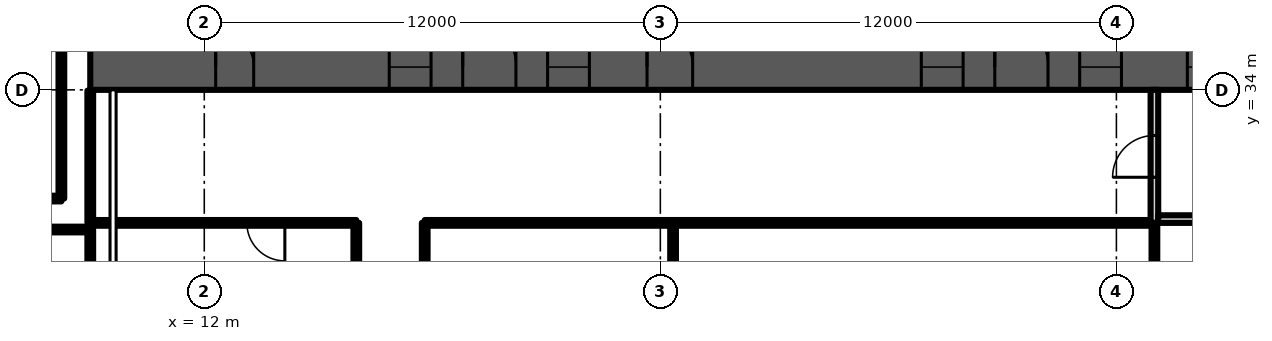
"""IFC4 building model, lengths in metres.
Left out: names, types, materials, properties, quantities, classifications, styles, units other than length and angle.
Written with IfcOpenShell. Run it as: python <this file> out.ifc"""

import sys

from ifc_helpers import new_model, si_unit, direction, frame, frame_2d, origin, place, context, subcontext, project, spatial, rectangle, extrude, element, fill, save


model = new_model("IFC4")
c1 = context("Model", 3, precision=1e-05, world=origin(), true_north=direction((0.0, 1.0)))
c2 = subcontext(c1, "Body", "Model", "MODEL_VIEW")
j1 = project(units=[si_unit("LENGTHUNIT", "METRE"), si_unit("PLANEANGLEUNIT", "RADIAN")], contexts=[c1])
p1 = place(None, origin())
s1 = spatial("IfcSite", under=j1, at=p1, CompositionType="ELEMENT")
p2 = place(p1, origin())
s2 = spatial("IfcBuilding", under=s1, at=p2, CompositionType="ELEMENT")
p3 = place(p2, frame((0.0, 0.0, 91.9)))
s3 = spatial("IfcBuildingStorey", under=s2, at=p3, CompositionType="ELEMENT", Elevation=91.9)
p4 = place(p3, frame((9.0, 34.6, 0.0), z_axis=(0.0, 0.0, 1.0), x_axis=(1.0, 0.0, 0.0)))
e1 = element("IfcWall", 1, at=p4, inside=s3, PredefinedType="SHEAR", context=c2, shape_type="SweptSolid", body=[
    extrude(rectangle(XDim=56.0, YDim=1.2, at=frame_2d((28.0, 0.0))), origin(), (0.0, 0.0, 1.0), 4.8),
])
p5 = place(p4, frame((3.3, 0.0, 0.0)))
e2 = element("IfcOpeningElement", 2, at=p5, cuts=e1, PredefinedType="OPENING", context=c2, shape_type="SweptSolid", body=[
    extrude(rectangle(XDim=1.0, YDim=2.1, at=frame_2d((0.5, 1.05))), frame((0.0, 0.61, 0.0), z_axis=(0.0, -1.0, 0.0), x_axis=(1.0, 0.0, 0.0)), (0.0, 0.0, 1.0), 1.22),
])
p6 = place(p4, frame((7.867, 0.0, 0.0)))
e3 = element("IfcOpeningElement", 3, at=p6, cuts=e1, PredefinedType="OPENING", context=c2, shape_type="SweptSolid", body=[
    extrude(rectangle(XDim=1.1, YDim=2.1, at=frame_2d((0.55, 1.05))), frame((0.0, 0.61, 0.0), z_axis=(0.0, -1.0, 0.0), x_axis=(1.0, 0.0, 0.0)), (0.0, 0.0, 1.0), 1.22),
])
p7 = place(p4, frame((12.033, 0.0, 0.0)))
e4 = element("IfcOpeningElement", 4, at=p7, cuts=e1, PredefinedType="OPENING", context=c2, shape_type="SweptSolid", body=[
    extrude(rectangle(XDim=1.1, YDim=2.1, at=frame_2d((0.55, 1.05))), frame((0.0, 0.61, 0.0), z_axis=(0.0, -1.0, 0.0), x_axis=(1.0, 0.0, 0.0)), (0.0, 0.0, 1.0), 1.22),
])
p8 = place(p4, frame((9.8, 0.0, 0.0)))
e5 = element("IfcOpeningElement", 5, at=p8, cuts=e1, PredefinedType="OPENING", context=c2, shape_type="SweptSolid", body=[
    extrude(rectangle(XDim=1.4, YDim=2.1, at=frame_2d((0.7, 1.05))), frame((0.0, 0.61, 0.0), z_axis=(0.0, -1.0, 0.0), x_axis=(1.0, 0.0, 0.0)), (0.0, 0.0, 1.0), 1.22),
])
p9 = place(p4, frame((14.65, 0.0, 0.0)))
e6 = element("IfcOpeningElement", 6, at=p9, cuts=e1, PredefinedType="OPENING", context=c2, shape_type="SweptSolid", body=[
    extrude(rectangle(XDim=1.2, YDim=2.1, at=frame_2d((0.6, 1.05))), frame((0.0, 0.61, 0.0), z_axis=(0.0, -1.0, 0.0), x_axis=(1.0, 0.0, 0.0)), (0.0, 0.0, 1.0), 1.22),
])
p10 = place(p4, frame((21.867, 0.0, 0.0)))
e7 = element("IfcOpeningElement", 7, at=p10, cuts=e1, PredefinedType="OPENING", context=c2, shape_type="SweptSolid", body=[
    extrude(rectangle(XDim=1.1, YDim=2.1, at=frame_2d((0.55, 1.05))), frame((0.0, 0.61, 0.0), z_axis=(0.0, -1.0, 0.0), x_axis=(1.0, 0.0, 0.0)), (0.0, 0.0, 1.0), 1.22),
])
p11 = place(p4, frame((26.033, 0.0, 0.0)))
e8 = element("IfcOpeningElement", 8, at=p11, cuts=e1, PredefinedType="OPENING", context=c2, shape_type="SweptSolid", body=[
    extrude(rectangle(XDim=1.1, YDim=2.1, at=frame_2d((0.55, 1.05))), frame((0.0, 0.61, 0.0), z_axis=(0.0, -1.0, 0.0), x_axis=(1.0, 0.0, 0.0)), (0.0, 0.0, 1.0), 1.22),
])
p12 = place(p4, frame((23.8, 0.0, 0.0)))
e9 = element("IfcOpeningElement", 9, at=p12, cuts=e1, PredefinedType="OPENING", context=c2, shape_type="SweptSolid", body=[
    extrude(rectangle(XDim=1.4, YDim=2.1, at=frame_2d((0.7, 1.05))), frame((0.0, 0.61, 0.0), z_axis=(0.0, -1.0, 0.0), x_axis=(1.0, 0.0, 0.0)), (0.0, 0.0, 1.0), 1.22),
])
p13 = place(p4, frame((28.867, 0.0, 0.0)))
e10 = element("IfcOpeningElement", 10, at=p13, cuts=e1, PredefinedType="OPENING", context=c2, shape_type="SweptSolid", body=[
    extrude(rectangle(XDim=1.1, YDim=2.1, at=frame_2d((0.55, 1.05))), frame((0.0, 0.61, 0.0), z_axis=(0.0, -1.0, 0.0), x_axis=(1.0, 0.0, 0.0)), (0.0, 0.0, 1.0), 1.22),
])
p14 = place(p4, frame((33.033, 0.0, 0.0)))
e11 = element("IfcOpeningElement", 11, at=p14, cuts=e1, PredefinedType="OPENING", context=c2, shape_type="SweptSolid", body=[
    extrude(rectangle(XDim=1.1, YDim=2.1, at=frame_2d((0.55, 1.05))), frame((0.0, 0.61, 0.0), z_axis=(0.0, -1.0, 0.0), x_axis=(1.0, 0.0, 0.0)), (0.0, 0.0, 1.0), 1.22),
])
p15 = place(p4, frame((40.15, 0.0, 0.0)))
e12 = element("IfcOpeningElement", 12, at=p15, cuts=e1, PredefinedType="OPENING", context=c2, shape_type="SweptSolid", body=[
    extrude(rectangle(XDim=1.2, YDim=2.1, at=frame_2d((0.6, 1.05))), frame((0.0, 0.61, 0.0), z_axis=(0.0, -1.0, 0.0), x_axis=(1.0, 0.0, 0.0)), (0.0, 0.0, 1.0), 1.22),
])
p16 = place(p4, frame((44.8, 0.0, 0.0)))
e13 = element("IfcOpeningElement", 13, at=p16, cuts=e1, PredefinedType="OPENING", context=c2, shape_type="SweptSolid", body=[
    extrude(rectangle(XDim=1.4, YDim=2.1, at=frame_2d((0.7, 1.05))), frame((0.0, 0.61, 0.0), z_axis=(0.0, -1.0, 0.0), x_axis=(1.0, 0.0, 0.0)), (0.0, 0.0, 1.0), 1.22),
])
p17 = place(p4, frame((49.867, 0.0, 0.0)))
e14 = element("IfcOpeningElement", 14, at=p17, cuts=e1, PredefinedType="OPENING", context=c2, shape_type="SweptSolid", body=[
    extrude(rectangle(XDim=1.1, YDim=2.1, at=frame_2d((0.55, 1.05))), frame((0.0, 0.61, 0.0), z_axis=(0.0, -1.0, 0.0), x_axis=(1.0, 0.0, 0.0)), (0.0, 0.0, 1.0), 1.22),
])
p18 = place(p4, frame((53.5, 0.0, 0.0)))
e15 = element("IfcOpeningElement", 15, at=p18, cuts=e1, PredefinedType="OPENING", context=c2, shape_type="SweptSolid", body=[
    extrude(rectangle(XDim=1.1, YDim=2.1, at=frame_2d((0.55, 1.05))), frame((0.0, 0.61, 0.0), z_axis=(0.0, -1.0, 0.0), x_axis=(1.0, 0.0, 0.0)), (0.0, 0.0, 1.0), 1.22),
])
p19 = place(p4, frame((51.567, 0.0, 0.0)))
e16 = element("IfcOpeningElement", 16, at=p19, cuts=e1, PredefinedType="OPENING", context=c2, shape_type="SweptSolid", body=[
    extrude(rectangle(XDim=1.4, YDim=2.1, at=frame_2d((0.7, 1.05))), frame((0.0, 0.61, 0.0), z_axis=(0.0, -1.0, 0.0), x_axis=(1.0, 0.0, 0.0)), (0.0, 0.0, 1.0), 1.22),
])
p20 = place(p3, frame((37.0, 30.5, 0.0), z_axis=(0.0, 0.0, 1.0), x_axis=(0.0, 1.0, 0.0)))
e17 = element("IfcWall", 17, at=p20, inside=s3, PredefinedType="PARTITIONING", context=c2, shape_type="SweptSolid", body=[
    extrude(rectangle(XDim=3.5, YDim=0.2, at=frame_2d((1.75, 0.0))), origin(), (0.0, 0.0, 1.0), 4.4),
])
p21 = place(p20, frame((1.2, 0.0, 0.0)))
e18 = element("IfcOpeningElement", 18, at=p21, cuts=e17, PredefinedType="OPENING", context=c2, shape_type="SweptSolid", body=[
    extrude(rectangle(XDim=1.1, YDim=2.1, at=frame_2d((0.55, 1.05))), frame((0.0, 0.11, 0.0), z_axis=(0.0, -1.0, 0.0), x_axis=(1.0, 0.0, 0.0)), (0.0, 0.0, 1.0), 0.22),
])
p22 = place(p3, frame((37.1, 30.6, 0.0), z_axis=(0.0, 0.0, 1.0), x_axis=(1.0, 0.0, 0.0)))
e19 = element("IfcWall", 19, at=p22, inside=s3, PredefinedType="PARTITIONING", context=c2, shape_type="SweptSolid", body=[
    extrude(rectangle(XDim=2.8, YDim=0.2, at=frame_2d((1.4, 0.0))), origin(), (0.0, 0.0, 1.0), 4.4),
])
p23 = place(p3, frame((6.84, 30.325, 0.0), z_axis=(0.0, 0.0, 1.0), x_axis=(1.0, 0.0, 0.0)))
e20 = element("IfcWall", 20, at=p23, inside=s3, PredefinedType="PARTITIONING", context=c2, shape_type="SweptSolid", body=[
    extrude(rectangle(XDim=2.16, YDim=0.15, at=frame_2d((1.08, 0.0))), origin(), (0.0, 0.0, 1.0), 4.4),
])
p24 = place(p3, frame((6.84, 31.14, 0.0), z_axis=(0.0, 0.0, 1.0), x_axis=(1.0, 0.0, 0.0)))
e21 = element("IfcWall", 21, at=p24, inside=s3, PredefinedType="PARTITIONING", context=c2, shape_type="SweptSolid", body=[
    extrude(rectangle(XDim=1.4, YDim=0.15, at=frame_2d((0.7, 0.0))), origin(), (0.0, 0.0, 1.0), 4.4),
])
p25 = place(p3, frame((8.24, 31.14, 0.0), z_axis=(0.0, 0.0, 1.0), x_axis=(0.0, 1.0, 0.0)))
e22 = element("IfcWall", 22, at=p25, inside=s3, PredefinedType="PARTITIONING", context=c2, shape_type="SweptSolid", body=[
    extrude(rectangle(XDim=10.061, YDim=0.15, at=frame_2d((5.03, 0.0))), origin(), (0.0, 0.0, 1.0), 4.4),
])
p26 = place(p3, frame((9.0, 24.895, 0.0), z_axis=(0.0, 0.0, 1.0), x_axis=(0.0, 1.0, 0.0)))
e23 = element("IfcWall", 23, at=p26, inside=s3, PredefinedType="PARTITIONING", context=c2, shape_type="SweptSolid", body=[
    extrude(rectangle(XDim=5.43, YDim=0.15, at=frame_2d((2.715, 0.0))), origin(), (0.0, 0.0, 1.0), 4.4),
])
p27 = place(p3, frame((9.0, 30.5, 0.0), z_axis=(0.0, 0.0, 1.0), x_axis=(0.0, 1.0, 0.0)))
e24 = element("IfcWall", 24, at=p27, inside=s3, PredefinedType="PARTITIONING", context=c2, shape_type="SweptSolid", body=[
    extrude(rectangle(XDim=3.48, YDim=0.15, at=frame_2d((1.74, 0.0))), origin(), (0.0, 0.0, 1.0), 4.4),
])
p28 = place(p3, frame((9.0, 30.5, 0.0), z_axis=(0.0, 0.0, 1.0), x_axis=(1.0, 0.0, 0.0)))
e25 = element("IfcWall", 25, at=p28, inside=s3, PredefinedType="PARTITIONING", context=c2, shape_type="SweptSolid", body=[
    extrude(rectangle(XDim=7.0, YDim=0.15, at=frame_2d((3.5, 0.0))), origin(), (0.0, 0.0, 1.0), 4.4),
])
p29 = place(p28, frame((4.12, 0.0, 0.0)))
e26 = element("IfcOpeningElement", 26, at=p29, cuts=e25, PredefinedType="OPENING", context=c2, shape_type="SweptSolid", body=[
    extrude(rectangle(XDim=1.0, YDim=2.1, at=frame_2d((0.5, 1.05))), frame((0.0, 0.085, 0.0), z_axis=(0.0, -1.0, 0.0), x_axis=(1.0, 0.0, 0.0)), (0.0, 0.0, 1.0), 0.17),
])
p30 = place(p3, frame((16.0, 24.895, 0.0), z_axis=(0.0, 0.0, 1.0), x_axis=(0.0, 1.0, 0.0)))
e27 = element("IfcWall", 27, at=p30, inside=s3, PredefinedType="PARTITIONING", context=c2, shape_type="SweptSolid", body=[
    extrude(rectangle(XDim=5.605, YDim=0.15, at=frame_2d((2.802, 0.0))), origin(), (0.0, 0.0, 1.0), 4.4),
])
p31 = place(p3, frame((17.8, 23.935, 0.0), z_axis=(0.0, 0.0, 1.0), x_axis=(0.0, 1.0, 0.0)))
e28 = element("IfcWall", 28, at=p31, inside=s3, PredefinedType="PARTITIONING", context=c2, shape_type="SweptSolid", body=[
    extrude(rectangle(XDim=6.565, YDim=0.15, at=frame_2d((3.282, 0.0))), origin(), (0.0, 0.0, 1.0), 4.4),
])
p32 = place(p3, frame((17.8, 30.5, 0.0), z_axis=(0.0, 0.0, 1.0), x_axis=(1.0, 0.0, 0.0)))
e29 = element("IfcWall", 29, at=p32, inside=s3, PredefinedType="PARTITIONING", context=c2, shape_type="SweptSolid", body=[
    extrude(rectangle(XDim=19.05, YDim=0.15, at=frame_2d((9.525, 0.0))), origin(), (0.0, 0.0, 1.0), 4.4),
])
for number, where, z_axis, x_axis in (
    (30, (24.335, 14.24, 0.0), (0.0, 0.0, 1.0), (0.0, 1.0, 0.0)),
    (31, (37.0, 14.24, 0.0), (0.0, 0.0, 1.0), (0.0, 1.0, 0.0)),
):
    element("IfcWall", number, at=place(p3, frame(where, z_axis=z_axis, x_axis=x_axis)), inside=s3, PredefinedType="PARTITIONING", context=c2, shape_type="SweptSolid", body=[
        extrude(rectangle(XDim=16.26, YDim=0.15, at=frame_2d((8.13, 0.0))), origin(), (0.0, 0.0, 1.0), 4.4),
    ])
p33 = place(p5, origin())
e32 = element("IfcDoor", 32, at=p33, inside=s3, OperationType="SINGLE_SWING_LEFT", PredefinedType="DOOR", context=c2, shape_type="SweptSolid", body=[
    extrude(rectangle(XDim=1.0, YDim=2.1, at=frame_2d((0.5, 1.05))), frame((0.0, 0.6, 0.0), z_axis=(0.0, -1.0, 0.0), x_axis=(1.0, 0.0, 0.0)), (0.0, 0.0, 1.0), 1.199),
])
fill(e2, e32)
p34 = place(p6, origin())
e33 = element("IfcDoor", 33, at=p34, inside=s3, OperationType="DOUBLE_DOOR_SLIDING", PredefinedType="DOOR", context=c2, shape_type="SweptSolid", body=[
    extrude(rectangle(XDim=1.1, YDim=2.1, at=frame_2d((0.55, 1.05))), frame((0.0, 0.025, 0.0), z_axis=(0.0, -1.0, 0.0), x_axis=(1.0, 0.0, 0.0)), (0.0, 0.0, 1.0), 0.05),
])
fill(e3, e33)
p35 = place(p7, origin())
e34 = element("IfcDoor", 34, at=p35, inside=s3, OperationType="DOUBLE_DOOR_SLIDING", PredefinedType="DOOR", context=c2, shape_type="SweptSolid", body=[
    extrude(rectangle(XDim=1.1, YDim=2.1, at=frame_2d((0.55, 1.05))), frame((0.0, 0.025, 0.0), z_axis=(0.0, -1.0, 0.0), x_axis=(1.0, 0.0, 0.0)), (0.0, 0.0, 1.0), 0.05),
])
fill(e4, e34)
p36 = place(p8, origin())
e35 = element("IfcDoor", 35, at=p36, inside=s3, OperationType="DOUBLE_DOOR_SINGLE_SWING", PredefinedType="DOOR", context=c2, shape_type="SweptSolid", body=[
    extrude(rectangle(XDim=1.4, YDim=2.1, at=frame_2d((0.7, 1.05))), frame((0.0, 0.025, 0.0), z_axis=(0.0, -1.0, 0.0), x_axis=(1.0, 0.0, 0.0)), (0.0, 0.0, 1.0), 0.05),
])
fill(e5, e35)
p37 = place(p9, origin())
e36 = element("IfcDoor", 36, at=p37, inside=s3, OperationType="SINGLE_SWING_LEFT", PredefinedType="DOOR", context=c2, shape_type="SweptSolid", body=[
    extrude(rectangle(XDim=1.2, YDim=2.1, at=frame_2d((0.6, 1.05))), frame((0.0, 0.025, 0.0), z_axis=(0.0, -1.0, 0.0), x_axis=(1.0, 0.0, 0.0)), (0.0, 0.0, 1.0), 0.05),
])
fill(e6, e36)
p38 = place(p10, origin())
e37 = element("IfcDoor", 37, at=p38, inside=s3, OperationType="DOUBLE_DOOR_SLIDING", PredefinedType="DOOR", context=c2, shape_type="SweptSolid", body=[
    extrude(rectangle(XDim=1.1, YDim=2.1, at=frame_2d((0.55, 1.05))), frame((0.0, 0.025, 0.0), z_axis=(0.0, -1.0, 0.0), x_axis=(1.0, 0.0, 0.0)), (0.0, 0.0, 1.0), 0.05),
])
fill(e7, e37)
p39 = place(p11, origin())
e38 = element("IfcDoor", 38, at=p39, inside=s3, OperationType="DOUBLE_DOOR_SLIDING", PredefinedType="DOOR", context=c2, shape_type="SweptSolid", body=[
    extrude(rectangle(XDim=1.1, YDim=2.1, at=frame_2d((0.55, 1.05))), frame((0.0, 0.025, 0.0), z_axis=(0.0, -1.0, 0.0), x_axis=(1.0, 0.0, 0.0)), (0.0, 0.0, 1.0), 0.05),
])
fill(e8, e38)
p40 = place(p12, origin())
e39 = element("IfcDoor", 39, at=p40, inside=s3, OperationType="DOUBLE_DOOR_SINGLE_SWING", PredefinedType="DOOR", context=c2, shape_type="SweptSolid", body=[
    extrude(rectangle(XDim=1.4, YDim=2.1, at=frame_2d((0.7, 1.05))), frame((0.0, 0.025, 0.0), z_axis=(0.0, -1.0, 0.0), x_axis=(1.0, 0.0, 0.0)), (0.0, 0.0, 1.0), 0.05),
])
fill(e9, e39)
p41 = place(p13, origin())
e40 = element("IfcDoor", 40, at=p41, inside=s3, OperationType="DOUBLE_DOOR_SLIDING", PredefinedType="DOOR", context=c2, shape_type="SweptSolid", body=[
    extrude(rectangle(XDim=1.1, YDim=2.1, at=frame_2d((0.55, 1.05))), frame((0.0, 0.025, 0.0), z_axis=(0.0, -1.0, 0.0), x_axis=(1.0, 0.0, 0.0)), (0.0, 0.0, 1.0), 0.05),
])
fill(e10, e40)
p42 = place(p21, origin())
e41 = element("IfcDoor", 41, at=p42, inside=s3, OperationType="SINGLE_SWING_LEFT", PredefinedType="DOOR", context=c2, shape_type="SweptSolid", body=[
    extrude(rectangle(XDim=1.1, YDim=2.1, at=frame_2d((0.55, 1.05))), frame((0.0, 0.025, 0.0), z_axis=(0.0, -1.0, 0.0), x_axis=(1.0, 0.0, 0.0)), (0.0, 0.0, 1.0), 0.05),
])
fill(e18, e41)
p43 = place(p29, origin())
e42 = element("IfcDoor", 42, at=p43, inside=s3, OperationType="SINGLE_SWING_RIGHT", PredefinedType="DOOR", context=c2, shape_type="SweptSolid", body=[
    extrude(rectangle(XDim=1.0, YDim=2.1, at=frame_2d((0.5, 1.05))), frame((0.0, 0.025, 0.0), z_axis=(0.0, -1.0, 0.0), x_axis=(1.0, 0.0, 0.0)), (0.0, 0.0, 1.0), 0.05),
])
fill(e26, e42)
save(model, sys.argv[1])
